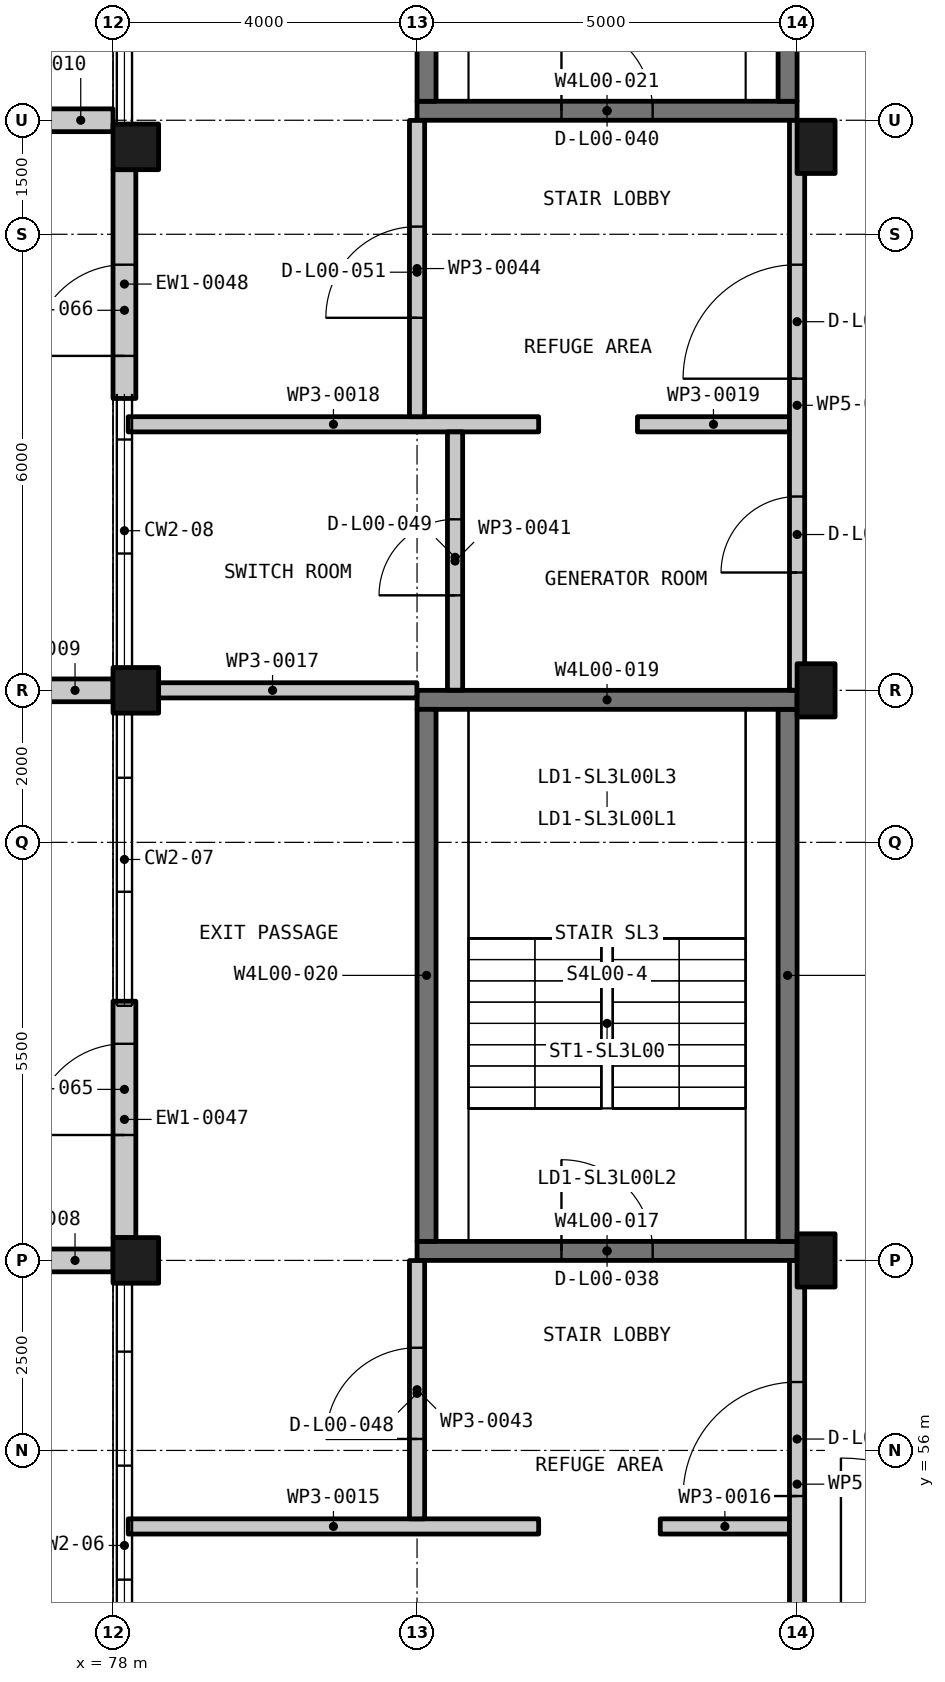
"""IFC4 building model, lengths in metres.
Left out: names, types, materials, properties, quantities, classifications, styles, units other than length and angle.
Written with IfcOpenShell. Run it as: python <this file> out.ifc"""

import sys

from ifc_helpers import new_model, si_unit, direction, frame, frame_2d, origin, origin_2d, place, context, subcontext, project, spatial, rectangle, extrude, element, fill, save


model = new_model("IFC4")
c1 = context("Model", 3, precision=1e-05, world=origin(), true_north=direction((0.0, 1.0)))
c2 = subcontext(c1, "Body", "Model", "MODEL_VIEW")
j1 = project(units=[si_unit("LENGTHUNIT", "METRE"), si_unit("PLANEANGLEUNIT", "RADIAN")], contexts=[c1])
p1 = place(None, origin())
s1 = spatial("IfcSite", under=j1, at=p1, CompositionType="ELEMENT")
p2 = place(p1, origin())
s2 = spatial("IfcBuilding", under=s1, at=p2, CompositionType="ELEMENT")
p3 = place(p2, origin())
s3 = spatial("IfcBuildingStorey", under=s2, at=p3, CompositionType="ELEMENT", Elevation=0.0)
for number, where, z_axis, x_axis in (
    (1, (78.3, 58.5, -0.2), (0.0, 0.0, 1.0), (1.0, 0.0, 0.0)),
    (2, (78.3, 66.0, -0.2), (0.0, 0.0, 1.0), (1.0, 0.0, 0.0)),
    (3, (78.3, 73.15, -0.2), (0.0, 0.0, 1.0), (1.0, 0.0, 0.0)),
):
    element("IfcColumn", number, at=place(p3, frame(where, z_axis=z_axis, x_axis=x_axis)), inside=s3, PredefinedType="COLUMN", context=c2, shape_type="SweptSolid", body=[
        extrude(rectangle(XDim=0.6, YDim=0.6, at=origin_2d()), origin(), (0.0, 0.0, 1.0), 5.9),
    ])
for number, where, z_axis, x_axis in (
    (4, (87.25, 58.5, -0.2), (0.0, 0.0, 1.0), (1.0, 0.0, 0.0)),
    (5, (87.25, 66.0, -0.2), (0.0, 0.0, 1.0), (1.0, 0.0, 0.0)),
    (6, (87.25, 73.15, -0.2), (0.0, 0.0, 1.0), (1.0, 0.0, 0.0)),
):
    element("IfcColumn", number, at=place(p3, frame(where, z_axis=z_axis, x_axis=x_axis)), inside=s3, PredefinedType="COLUMN", context=c2, shape_type="SweptSolid", body=[
        extrude(rectangle(XDim=0.5, YDim=0.7, at=origin_2d()), origin(), (0.0, 0.0, 1.0), 5.9),
    ])
p4 = place(p3, frame((82.0, 58.625, -0.2), z_axis=(0.0, 0.0, 1.0), x_axis=(1.0, 0.0, 0.0)))
e7 = element("IfcWall", 7, at=p4, inside=s3, PredefinedType="SHEAR", context=c2, shape_type="SweptSolid", body=[
    extrude(rectangle(XDim=5.0, YDim=0.25, at=frame_2d((2.5, 0.0))), origin(), (0.0, 0.0, 1.0), 5.9),
])
p5 = place(p4, frame((1.9, 0.0, 0.2)))
e8 = element("IfcOpeningElement", 8, at=p5, cuts=e7, PredefinedType="OPENING", context=c2, shape_type="SweptSolid", body=[
    extrude(rectangle(XDim=1.2, YDim=2.2, at=frame_2d((0.6, 1.1))), frame((0.0, 0.135, 0.0), z_axis=(0.0, -1.0, 0.0), x_axis=(1.0, 0.0, 0.0)), (0.0, 0.0, 1.0), 0.27),
])
p6 = place(p3, frame((86.875, 58.75, -0.2), z_axis=(0.0, 0.0, 1.0), x_axis=(0.0, 1.0, 0.0)))
e9 = element("IfcWall", 9, at=p6, inside=s3, PredefinedType="SHEAR", context=c2, shape_type="SweptSolid", body=[
    extrude(rectangle(XDim=7.0, YDim=0.25, at=frame_2d((3.5, 0.0))), origin(), (0.0, 0.0, 1.0), 5.9),
])
p7 = place(p3, frame((82.0, 65.875, -0.2), z_axis=(0.0, 0.0, 1.0), x_axis=(1.0, 0.0, 0.0)))
e10 = element("IfcWall", 10, at=p7, inside=s3, PredefinedType="SHEAR", context=c2, shape_type="SweptSolid", body=[
    extrude(rectangle(XDim=5.0, YDim=0.25, at=frame_2d((2.5, 0.0))), origin(), (0.0, 0.0, 1.0), 5.9),
])
p8 = place(p3, frame((82.125, 58.75, -0.2), z_axis=(0.0, 0.0, 1.0), x_axis=(0.0, 1.0, 0.0)))
e11 = element("IfcWall", 11, at=p8, inside=s3, PredefinedType="SHEAR", context=c2, shape_type="SweptSolid", body=[
    extrude(rectangle(XDim=7.0, YDim=0.25, at=frame_2d((3.5, 0.0))), origin(), (0.0, 0.0, 1.0), 5.9),
])
p9 = place(p3, frame((82.0, 73.625, -0.2), z_axis=(0.0, 0.0, 1.0), x_axis=(1.0, 0.0, 0.0)))
e12 = element("IfcWall", 12, at=p9, inside=s3, PredefinedType="SHEAR", context=c2, shape_type="SweptSolid", body=[
    extrude(rectangle(XDim=5.0, YDim=0.25, at=frame_2d((2.5, 0.0))), origin(), (0.0, 0.0, 1.0), 5.9),
])
p10 = place(p9, frame((1.9, 0.0, 0.2)))
e13 = element("IfcOpeningElement", 13, at=p10, cuts=e12, PredefinedType="OPENING", context=c2, shape_type="SweptSolid", body=[
    extrude(rectangle(XDim=1.2, YDim=2.2, at=frame_2d((0.6, 1.1))), frame((0.0, 0.135, 0.0), z_axis=(0.0, -1.0, 0.0), x_axis=(1.0, 0.0, 0.0)), (0.0, 0.0, 1.0), 0.27),
])
for number, where, z_axis, x_axis in (
    (14, (86.875, 73.75, -0.2), (0.0, 0.0, 1.0), (0.0, 1.0, 0.0)),
    (15, (82.125, 73.75, -0.2), (0.0, 0.0, 1.0), (0.0, 1.0, 0.0)),
):
    element("IfcWall", number, at=place(p3, frame(where, z_axis=z_axis, x_axis=x_axis)), inside=s3, PredefinedType="SHEAR", context=c2, shape_type="SweptSolid", body=[
        extrude(rectangle(XDim=7.0, YDim=0.25, at=frame_2d((3.5, 0.0))), origin(), (0.0, 0.0, 1.0), 5.9),
    ])
p11 = place(p3, frame((78.15, 58.8, 0.0), z_axis=(0.0, 0.0, 1.0), x_axis=(0.0, 1.0, 0.0)))
e16 = element("IfcWall", 16, at=p11, inside=s3, PredefinedType="SOLIDWALL", context=c2, shape_type="SweptSolid", body=[
    extrude(rectangle(XDim=3.11, YDim=0.3, at=frame_2d((1.555, 0.0))), origin(), (0.0, 0.0, 1.0), 4.9),
])
p12 = place(p11, frame((1.35, 0.0, 0.0)))
e17 = element("IfcOpeningElement", 17, at=p12, cuts=e16, PredefinedType="OPENING", context=c2, shape_type="SweptSolid", body=[
    extrude(rectangle(XDim=1.2, YDim=2.2, at=frame_2d((0.6, 1.1))), frame((0.0, 0.16, 0.0), z_axis=(0.0, -1.0, 0.0), x_axis=(1.0, 0.0, 0.0)), (0.0, 0.0, 1.0), 0.32),
])
p13 = place(p3, frame((78.15, 69.84, 0.0), z_axis=(0.0, 0.0, 1.0), x_axis=(0.0, 1.0, 0.0)))
e18 = element("IfcWall", 18, at=p13, inside=s3, PredefinedType="SOLIDWALL", context=c2, shape_type="SweptSolid", body=[
    extrude(rectangle(XDim=3.01, YDim=0.3, at=frame_2d((1.505, 0.0))), origin(), (0.0, 0.0, 1.0), 4.9),
])
p14 = place(p13, frame((0.56, 0.0, 0.0)))
e19 = element("IfcOpeningElement", 19, at=p14, cuts=e18, PredefinedType="OPENING", context=c2, shape_type="SweptSolid", body=[
    extrude(rectangle(XDim=1.2, YDim=2.2, at=frame_2d((0.6, 1.1))), frame((0.0, 0.16, 0.0), z_axis=(0.0, -1.0, 0.0), x_axis=(1.0, 0.0, 0.0)), (0.0, 0.0, 1.0), 0.32),
])
for number, where, z_axis, x_axis in (
    (20, (77.0, 58.5, 0.0), (0.0, 0.0, 1.0), (1.0, 0.0, 0.0)),
    (21, (77.0, 66.0, 0.0), (0.0, 0.0, 1.0), (1.0, 0.0, 0.0)),
):
    element("IfcWall", number, at=place(p3, frame(where, z_axis=z_axis, x_axis=x_axis)), inside=s3, PredefinedType="SOLIDWALL", context=c2, shape_type="SweptSolid", body=[
        extrude(rectangle(XDim=1.0, YDim=0.3, at=frame_2d((0.5, 0.0))), origin(), (0.0, 0.0, 1.0), 6.0),
    ])
p15 = place(p3, frame((77.15, 73.5, 0.0), z_axis=(0.0, 0.0, 1.0), x_axis=(1.0, 0.0, 0.0)))
e22 = element("IfcWall", 22, at=p15, inside=s3, PredefinedType="SOLIDWALL", context=c2, shape_type="SweptSolid", body=[
    extrude(rectangle(XDim=0.85, YDim=0.3, at=frame_2d((0.425, 0.0))), origin(), (0.0, 0.0, 1.0), 6.0),
])
p16 = place(p3, frame((78.2, 55.0, 0.0), z_axis=(0.0, 0.0, 1.0), x_axis=(1.0, 0.0, 0.0)))
e23 = element("IfcWall", 23, at=p16, inside=s3, PredefinedType="PARTITIONING", context=c2, shape_type="SweptSolid", body=[
    extrude(rectangle(XDim=5.4, YDim=0.2, at=frame_2d((2.7, 0.0))), origin(), (0.0, 0.0, 1.0), 4.9),
])
p17 = place(p3, frame((85.2, 55.0, 0.0), z_axis=(0.0, 0.0, 1.0), x_axis=(1.0, 0.0, 0.0)))
e24 = element("IfcWall", 24, at=p17, inside=s3, PredefinedType="PARTITIONING", context=c2, shape_type="SweptSolid", body=[
    extrude(rectangle(XDim=1.7, YDim=0.2, at=frame_2d((0.85, 0.0))), origin(), (0.0, 0.0, 1.0), 5.1),
])
p18 = place(p3, frame((78.2, 66.0, 0.0), z_axis=(0.0, 0.0, 1.0), x_axis=(1.0, 0.0, 0.0)))
e25 = element("IfcWall", 25, at=p18, inside=s3, PredefinedType="PARTITIONING", context=c2, shape_type="SweptSolid", body=[
    extrude(rectangle(XDim=3.798, YDim=0.2, at=frame_2d((1.899, 0.0))), origin(), (0.0, 0.0, 1.0), 4.9),
])
p19 = place(p3, frame((78.2, 69.5, 0.0), z_axis=(0.0, 0.0, 1.0), x_axis=(1.0, 0.0, 0.0)))
e26 = element("IfcWall", 26, at=p19, inside=s3, PredefinedType="PARTITIONING", context=c2, shape_type="SweptSolid", body=[
    extrude(rectangle(XDim=5.4, YDim=0.2, at=frame_2d((2.7, 0.0))), origin(), (0.0, 0.0, 1.0), 4.9),
])
p20 = place(p3, frame((84.9, 69.5, 0.0), z_axis=(0.0, 0.0, 1.0), x_axis=(1.0, 0.0, 0.0)))
e27 = element("IfcWall", 27, at=p20, inside=s3, PredefinedType="PARTITIONING", context=c2, shape_type="SweptSolid", body=[
    extrude(rectangle(XDim=2.0, YDim=0.2, at=frame_2d((1.0, 0.0))), origin(), (0.0, 0.0, 1.0), 5.1),
])
p21 = place(p3, frame((87.0, 52.615, 0.0), z_axis=(0.0, 0.0, 1.0), x_axis=(0.0, 1.0, 0.0)))
e28 = element("IfcWall", 28, at=p21, inside=s3, PredefinedType="PARTITIONING", context=c2, shape_type="SweptSolid", body=[
    extrude(rectangle(XDim=5.884, YDim=0.2, at=frame_2d((2.942, 0.0))), origin(), (0.0, 0.0, 1.0), 4.9),
])
p22 = place(p21, frame((2.785, 0.0, 0.0)))
e29 = element("IfcOpeningElement", 29, at=p22, cuts=e28, PredefinedType="OPENING", context=c2, shape_type="SweptSolid", body=[
    extrude(rectangle(XDim=1.5, YDim=2.1, at=frame_2d((0.75, 1.05))), frame((0.0, 0.11, 0.0), z_axis=(0.0, -1.0, 0.0), x_axis=(1.0, 0.0, 0.0)), (0.0, 0.0, 1.0), 0.22),
])
p23 = place(p3, frame((87.0, 66.002, 0.0), z_axis=(0.0, 0.0, 1.0), x_axis=(0.0, 1.0, 0.0)))
e30 = element("IfcWall", 30, at=p23, inside=s3, PredefinedType="PARTITIONING", context=c2, shape_type="SweptSolid", body=[
    extrude(rectangle(XDim=7.496, YDim=0.2, at=frame_2d((3.748, 0.0))), origin(), (0.0, 0.0, 1.0), 4.9),
])
p24 = place(p23, frame((4.098, 0.0, 0.0)))
e31 = element("IfcOpeningElement", 31, at=p24, cuts=e30, PredefinedType="OPENING", context=c2, shape_type="SweptSolid", body=[
    extrude(rectangle(XDim=1.5, YDim=2.1, at=frame_2d((0.75, 1.05))), frame((0.0, 0.11, 0.0), z_axis=(0.0, -1.0, 0.0), x_axis=(1.0, 0.0, 0.0)), (0.0, 0.0, 1.0), 0.22),
])
p25 = place(p23, frame((1.548, 0.0, 0.0)))
e32 = element("IfcOpeningElement", 32, at=p25, cuts=e30, PredefinedType="OPENING", context=c2, shape_type="SweptSolid", body=[
    extrude(rectangle(XDim=1.0, YDim=2.1, at=frame_2d((0.5, 1.05))), frame((0.0, 0.11, 0.0), z_axis=(0.0, -1.0, 0.0), x_axis=(1.0, 0.0, 0.0)), (0.0, 0.0, 1.0), 0.22),
])
p26 = place(p3, frame((82.5, 66.002, 0.0), z_axis=(0.0, 0.0, 1.0), x_axis=(0.0, 1.0, 0.0)))
e33 = element("IfcWall", 33, at=p26, inside=s3, PredefinedType="PARTITIONING", context=c2, shape_type="SweptSolid", body=[
    extrude(rectangle(XDim=3.398, YDim=0.2, at=frame_2d((1.699, 0.0))), origin(), (0.0, 0.0, 1.0), 4.9),
])
p27 = place(p26, frame((1.248, 0.0, 0.0)))
e34 = element("IfcOpeningElement", 34, at=p27, cuts=e33, PredefinedType="OPENING", context=c2, shape_type="SweptSolid", body=[
    extrude(rectangle(XDim=1.0, YDim=2.1, at=frame_2d((0.5, 1.05))), frame((0.0, 0.11, 0.0), z_axis=(0.0, -1.0, 0.0), x_axis=(1.0, 0.0, 0.0)), (0.0, 0.0, 1.0), 0.22),
])
p28 = place(p3, frame((82.0, 55.1, 0.0), z_axis=(0.0, 0.0, 1.0), x_axis=(0.0, 1.0, 0.0)))
e35 = element("IfcWall", 35, at=p28, inside=s3, PredefinedType="PARTITIONING", context=c2, shape_type="SweptSolid", body=[
    extrude(rectangle(XDim=3.398, YDim=0.2, at=frame_2d((1.699, 0.0))), origin(), (0.0, 0.0, 1.0), 4.9),
])
p29 = place(p28, frame((1.051, 0.0, 0.0)))
e36 = element("IfcOpeningElement", 36, at=p29, cuts=e35, PredefinedType="OPENING", context=c2, shape_type="SweptSolid", body=[
    extrude(rectangle(XDim=1.2, YDim=2.1, at=frame_2d((0.6, 1.05))), frame((0.0, 0.11, 0.0), z_axis=(0.0, -1.0, 0.0), x_axis=(1.0, 0.0, 0.0)), (0.0, 0.0, 1.0), 0.22),
])
p30 = place(p3, frame((82.0, 69.6, 0.0), z_axis=(0.0, 0.0, 1.0), x_axis=(0.0, 1.0, 0.0)))
e37 = element("IfcWall", 37, at=p30, inside=s3, PredefinedType="PARTITIONING", context=c2, shape_type="SweptSolid", body=[
    extrude(rectangle(XDim=3.898, YDim=0.2, at=frame_2d((1.949, 0.0))), origin(), (0.0, 0.0, 1.0), 4.9),
])
p31 = place(p30, frame((1.301, 0.0, 0.0)))
e38 = element("IfcOpeningElement", 38, at=p31, cuts=e37, PredefinedType="OPENING", context=c2, shape_type="SweptSolid", body=[
    extrude(rectangle(XDim=1.2, YDim=2.1, at=frame_2d((0.6, 1.05))), frame((0.0, 0.11, 0.0), z_axis=(0.0, -1.0, 0.0), x_axis=(1.0, 0.0, 0.0)), (0.0, 0.0, 1.0), 0.22),
])
p32 = place(p12, origin())
e39 = element("IfcDoor", 39, at=p32, inside=s3, OperationType="SINGLE_SWING_LEFT", PredefinedType="DOOR", context=c2, shape_type="SweptSolid", body=[
    extrude(rectangle(XDim=1.2, YDim=2.2, at=frame_2d((0.6, 1.1))), frame((0.0, 0.025, 0.0), z_axis=(0.0, -1.0, 0.0), x_axis=(1.0, 0.0, 0.0)), (0.0, 0.0, 1.0), 0.05),
])
fill(e17, e39)
p33 = place(p14, origin())
e40 = element("IfcDoor", 40, at=p33, inside=s3, OperationType="SINGLE_SWING_LEFT", PredefinedType="DOOR", context=c2, shape_type="SweptSolid", body=[
    extrude(rectangle(XDim=1.2, YDim=2.2, at=frame_2d((0.6, 1.1))), frame((0.0, 0.025, 0.0), z_axis=(0.0, -1.0, 0.0), x_axis=(1.0, 0.0, 0.0)), (0.0, 0.0, 1.0), 0.05),
])
fill(e19, e40)
p34 = place(p5, origin())
e41 = element("IfcDoor", 41, at=p34, inside=s3, OperationType="SINGLE_SWING_LEFT", PredefinedType="DOOR", context=c2, shape_type="SweptSolid", body=[
    extrude(rectangle(XDim=1.2, YDim=2.2, at=frame_2d((0.6, 1.1))), frame((0.0, 0.025, 0.0), z_axis=(0.0, -1.0, 0.0), x_axis=(1.0, 0.0, 0.0)), (0.0, 0.0, 1.0), 0.05),
])
fill(e8, e41)
p35 = place(p22, origin())
e42 = element("IfcDoor", 42, at=p35, inside=s3, OperationType="DOUBLE_DOOR_SINGLE_SWING", PredefinedType="DOOR", context=c2, shape_type="SweptSolid", body=[
    extrude(rectangle(XDim=1.5, YDim=2.1, at=frame_2d((0.75, 1.05))), frame((0.0, 0.025, 0.0), z_axis=(0.0, -1.0, 0.0), x_axis=(1.0, 0.0, 0.0)), (0.0, 0.0, 1.0), 0.05),
])
fill(e29, e42)
p36 = place(p10, origin())
e43 = element("IfcDoor", 43, at=p36, inside=s3, OperationType="SINGLE_SWING_LEFT", PredefinedType="DOOR", context=c2, shape_type="SweptSolid", body=[
    extrude(rectangle(XDim=1.2, YDim=2.2, at=frame_2d((0.6, 1.1))), frame((0.0, 0.025, 0.0), z_axis=(0.0, -1.0, 0.0), x_axis=(1.0, 0.0, 0.0)), (0.0, 0.0, 1.0), 0.05),
])
fill(e13, e43)
p37 = place(p24, origin())
e44 = element("IfcDoor", 44, at=p37, inside=s3, OperationType="DOUBLE_DOOR_SINGLE_SWING", PredefinedType="DOOR", context=c2, shape_type="SweptSolid", body=[
    extrude(rectangle(XDim=1.5, YDim=2.1, at=frame_2d((0.75, 1.05))), frame((0.0, 0.025, 0.0), z_axis=(0.0, -1.0, 0.0), x_axis=(1.0, 0.0, 0.0)), (0.0, 0.0, 1.0), 0.05),
])
fill(e31, e44)
p38 = place(p29, origin())
e45 = element("IfcDoor", 45, at=p38, inside=s3, OperationType="SINGLE_SWING_RIGHT", PredefinedType="DOOR", context=c2, shape_type="SweptSolid", body=[
    extrude(rectangle(XDim=1.2, YDim=2.1, at=frame_2d((0.6, 1.05))), frame((0.0, 0.025, 0.0), z_axis=(0.0, -1.0, 0.0), x_axis=(1.0, 0.0, 0.0)), (0.0, 0.0, 1.0), 0.05),
])
fill(e36, e45)
p39 = place(p27, origin())
e46 = element("IfcDoor", 46, at=p39, inside=s3, OperationType="SINGLE_SWING_LEFT", PredefinedType="DOOR", context=c2, shape_type="SweptSolid", body=[
    extrude(rectangle(XDim=1.0, YDim=2.1, at=frame_2d((0.5, 1.05))), frame((0.0, 0.025, 0.0), z_axis=(0.0, -1.0, 0.0), x_axis=(1.0, 0.0, 0.0)), (0.0, 0.0, 1.0), 0.05),
])
fill(e34, e46)
p40 = place(p25, origin())
e47 = element("IfcDoor", 47, at=p40, inside=s3, OperationType="SINGLE_SWING_RIGHT", PredefinedType="DOOR", context=c2, shape_type="SweptSolid", body=[
    extrude(rectangle(XDim=1.0, YDim=2.1, at=frame_2d((0.5, 1.05))), frame((0.0, 0.025, 0.0), z_axis=(0.0, -1.0, 0.0), x_axis=(1.0, 0.0, 0.0)), (0.0, 0.0, 1.0), 0.05),
])
fill(e32, e47)
p41 = place(p31, origin())
e48 = element("IfcDoor", 48, at=p41, inside=s3, OperationType="SINGLE_SWING_RIGHT", PredefinedType="DOOR", context=c2, shape_type="SweptSolid", body=[
    extrude(rectangle(XDim=1.2, YDim=2.1, at=frame_2d((0.6, 1.05))), frame((0.0, 0.025, 0.0), z_axis=(0.0, -1.0, 0.0), x_axis=(1.0, 0.0, 0.0)), (0.0, 0.0, 1.0), 0.05),
])
fill(e38, e48)
save(model, sys.argv[1])
